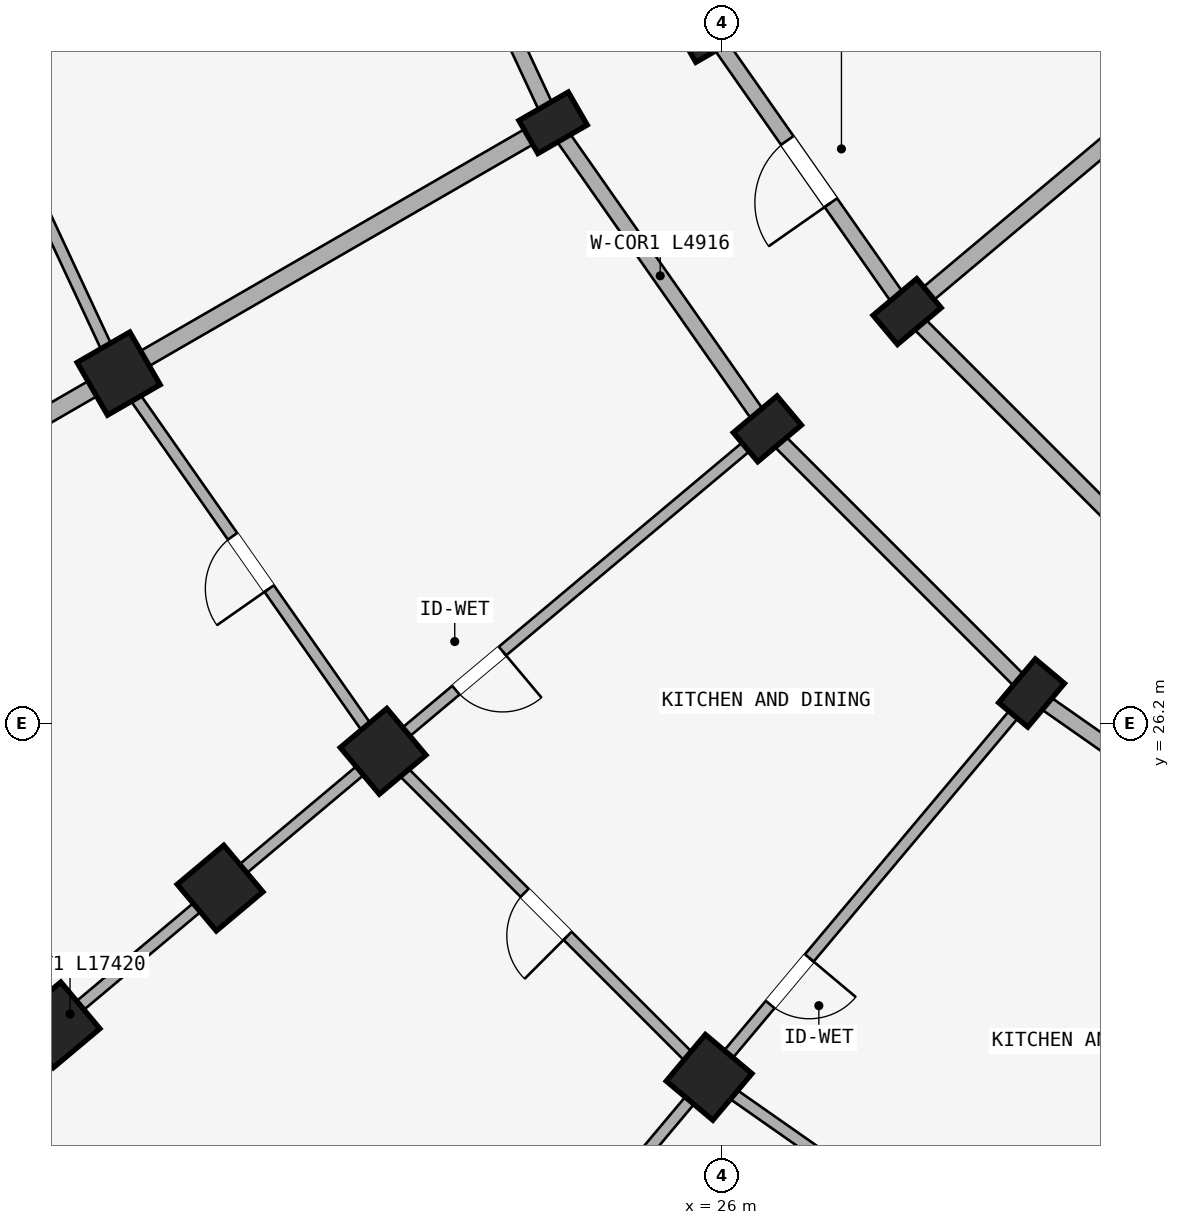
"""IFC4 building model, lengths in metres.
Left out: names, types, materials, properties, quantities, classifications, styles, units other than length and angle.
Written with IfcOpenShell. Run it as: python <this file> out.ifc"""

import sys

from ifc_helpers import new_model, si_unit, direction, frame, frame_2d, origin, origin_2d, place, context, subcontext, project, spatial, rectangle, extrude, element, fill, save


model = new_model("IFC4")
c1 = context("Model", 3, precision=1e-05, world=origin(), true_north=direction((0.0, 1.0)))
c2 = subcontext(c1, "Body", "Model", "MODEL_VIEW")
j1 = project(units=[si_unit("LENGTHUNIT", "METRE"), si_unit("PLANEANGLEUNIT", "RADIAN")], contexts=[c1])
p1 = place(None, origin())
s1 = spatial("IfcSite", under=j1, at=p1, CompositionType="ELEMENT")
p2 = place(p1, origin())
s2 = spatial("IfcBuilding", under=s1, at=p2, CompositionType="ELEMENT")
p3 = place(p2, frame((0.0, 0.0, 8.7)))
s3 = spatial("IfcBuildingStorey", under=s2, at=p3, CompositionType="ELEMENT", Elevation=8.7)
p4 = place(p3, frame((30.073, 26.598, 0.0), z_axis=(0.0, 0.0, 1.0), x_axis=(-0.766044443119, 0.642787609687, 0.0)))
e1 = element("IfcColumn", 1, at=p4, inside=s3, PredefinedType="COLUMN", context=c2, shape_type="SweptSolid", body=[
    extrude(rectangle(XDim=0.5, YDim=0.75, at=origin_2d()), origin(), (0.0, 0.0, 1.0), 2.93),
])
p5 = place(p3, frame((25.831, 21.542, 0.0), z_axis=(0.0, 0.0, 1.0), x_axis=(-0.766044443119, 0.642787609687, 0.0)))
e2 = element("IfcColumn", 2, at=p5, inside=s3, PredefinedType="COLUMN", context=c2, shape_type="SweptSolid", body=[
    extrude(rectangle(XDim=0.8, YDim=0.8, at=origin_2d()), origin(), (0.0, 0.0, 1.0), 2.93),
])
for number, where, z_axis, x_axis in (
    (3, (28.436, 31.616, 0.0), (0.0, 0.0, 1.0), (-0.643, 0.766, 0.0)),
    (4, (26.598, 30.073, 0.0), (0.0, 0.0, 1.0), (-0.643, 0.766, 0.0)),
):
    element("IfcColumn", number, at=place(p3, frame(where, z_axis=z_axis, x_axis=x_axis)), inside=s3, PredefinedType="COLUMN", context=c2, shape_type="SweptSolid", body=[
        extrude(rectangle(XDim=0.5, YDim=0.75, at=origin_2d()), origin(), (0.0, 0.0, 1.0), 2.93),
    ])
for number, where, z_axis, x_axis in (
    (5, (21.542, 25.831, 0.0), (0.0, 0.0, 1.0), (-0.643, 0.766, 0.0)),
    (6, (19.397, 24.031, 0.0), (0.0, 0.0, 1.0), (-0.643, 0.766, 0.0)),
    (7, (17.252, 22.231, 0.0), (0.0, 0.0, 1.0), (-0.643, 0.766, 0.0)),
):
    element("IfcColumn", number, at=place(p3, frame(where, z_axis=z_axis, x_axis=x_axis)), inside=s3, PredefinedType="COLUMN", context=c2, shape_type="SweptSolid", body=[
        extrude(rectangle(XDim=0.8, YDim=0.8, at=origin_2d()), origin(), (0.0, 0.0, 1.0), 2.93),
    ])
for number, where, z_axis, x_axis in (
    (8, (25.856, 35.3, 0.0), (0.0, 0.0, 1.0), (-0.5, 0.866, 0.0)),
    (9, (23.778, 34.1, 0.0), (0.0, 0.0, 1.0), (-0.5, 0.866, 0.0)),
):
    element("IfcColumn", number, at=place(p3, frame(where, z_axis=z_axis, x_axis=x_axis)), inside=s3, PredefinedType="COLUMN", context=c2, shape_type="SweptSolid", body=[
        extrude(rectangle(XDim=0.5, YDim=0.75, at=origin_2d()), origin(), (0.0, 0.0, 1.0), 2.93),
    ])
p6 = place(p3, frame((18.062, 30.8, 0.0), z_axis=(0.0, 0.0, 1.0), x_axis=(-0.5, 0.866025403784, 0.0)))
e10 = element("IfcColumn", 10, at=p6, inside=s3, PredefinedType="COLUMN", context=c2, shape_type="SweptSolid", body=[
    extrude(rectangle(XDim=0.8, YDim=0.8, at=origin_2d()), origin(), (0.0, 0.0, 1.0), 2.93),
])
p7 = place(p3, frame((34.1, 23.778, 0.0), z_axis=(0.0, 0.0, 1.0), x_axis=(-0.819140911474, 0.573592335331, 0.0)))
e11 = element("IfcWall", 11, at=p7, inside=s3, PredefinedType="STANDARD", context=c2, shape_type="SweptSolid", body=[
    extrude(rectangle(XDim=4.916, YDim=0.2, at=frame_2d((2.458, 0.0))), origin(), (0.0, 0.0, 1.0), 2.372),
])
p8 = place(p7, frame((1.918, 0.0, 0.0)))
e12 = element("IfcOpeningElement", 12, at=p8, cuts=e11, PredefinedType="OPENING", context=c2, shape_type="SweptSolid", body=[
    extrude(rectangle(XDim=1.08, YDim=2.15, at=frame_2d((0.54, 1.075))), frame((0.0, 0.11, 0.0), z_axis=(0.0, -1.0, 0.0), x_axis=(1.0, 0.0, 0.0)), (0.0, 0.0, 1.0), 0.22),
])
p9 = place(p3, frame((31.616, 28.436, 0.0), z_axis=(0.0, 0.0, 1.0), x_axis=(-0.707106781187, 0.707106781187, 0.0)))
e13 = element("IfcWall", 13, at=p9, inside=s3, PredefinedType="STANDARD", context=c2, shape_type="SweptSolid", body=[
    extrude(rectangle(XDim=4.497, YDim=0.2, at=frame_2d((2.249, 0.0))), origin(), (0.0, 0.0, 1.0), 2.372),
])
p10 = place(p3, frame((30.073, 26.598, 0.0), z_axis=(0.0, 0.0, 1.0), x_axis=(-0.707106781187, 0.707106781187, 0.0)))
e14 = element("IfcWall", 14, at=p10, inside=s3, PredefinedType="STANDARD", context=c2, shape_type="SweptSolid", body=[
    extrude(rectangle(XDim=4.916, YDim=0.2, at=frame_2d((2.458, 0.0))), origin(), (0.0, 0.0, 1.0), 2.372),
])
p11 = place(p3, frame((28.436, 31.616, 0.0), z_axis=(0.0, 0.0, 1.0), x_axis=(-0.573571637217, 0.819155404658, 0.0)))
e15 = element("IfcWall", 15, at=p11, inside=s3, PredefinedType="STANDARD", context=c2, shape_type="SweptSolid", body=[
    extrude(rectangle(XDim=4.497, YDim=0.2, at=frame_2d((2.249, 0.0))), origin(), (0.0, 0.0, 1.0), 2.372),
])
p12 = place(p11, frame((1.749, 0.0, 0.0)))
e16 = element("IfcOpeningElement", 16, at=p12, cuts=e15, PredefinedType="OPENING", context=c2, shape_type="SweptSolid", body=[
    extrude(rectangle(XDim=1.0, YDim=2.15, at=frame_2d((0.5, 1.075))), frame((0.0, 0.11, 0.0), z_axis=(0.0, -1.0, 0.0), x_axis=(1.0, 0.0, 0.0)), (0.0, 0.0, 1.0), 0.22),
])
p13 = place(p3, frame((26.598, 30.073, 0.0), z_axis=(0.0, 0.0, 1.0), x_axis=(-0.573592335331, 0.819140911474, 0.0)))
e17 = element("IfcWall", 17, at=p13, inside=s3, PredefinedType="STANDARD", context=c2, shape_type="SweptSolid", body=[
    extrude(rectangle(XDim=4.916, YDim=0.2, at=frame_2d((2.458, 0.0))), origin(), (0.0, 0.0, 1.0), 2.372),
])
p14 = place(p3, frame((23.778, 34.1, 0.0), z_axis=(0.0, 0.0, 1.0), x_axis=(-0.422629854778, 0.906302381024, 0.0)))
e18 = element("IfcWall", 18, at=p14, inside=s3, PredefinedType="STANDARD", context=c2, shape_type="SweptSolid", body=[
    extrude(rectangle(XDim=4.915, YDim=0.2, at=frame_2d((2.458, 0.0))), origin(), (0.0, 0.0, 1.0), 2.372),
])
p15 = place(p14, frame((1.888, 0.0, 0.0)))
e19 = element("IfcOpeningElement", 19, at=p15, cuts=e18, PredefinedType="OPENING", context=c2, shape_type="SweptSolid", body=[
    extrude(rectangle(XDim=1.14, YDim=2.15, at=frame_2d((0.57, 1.075))), frame((0.0, 0.11, 0.0), z_axis=(0.0, -1.0, 0.0), x_axis=(1.0, 0.0, 0.0)), (0.0, 0.0, 1.0), 0.22),
])
p16 = place(p3, frame((34.05, 23.691, 0.0), z_axis=(0.0, 0.0, 1.0), x_axis=(-0.499997843263, -0.866026648973, 0.0)))
e20 = element("IfcWall", 20, at=p16, inside=s3, PredefinedType="STANDARD", context=c2, shape_type="SweptSolid", body=[
    extrude(rectangle(XDim=17.42, YDim=0.23, at=frame_2d((8.71, 0.0))), origin(), (0.0, 0.0, 1.0), 2.372),
])
p17 = place(p3, frame((30.009, 26.521, 0.0), z_axis=(0.0, 0.0, 1.0), x_axis=(-0.642784757967, -0.766046835987, 0.0)))
e21 = element("IfcWall", 21, at=p17, inside=s3, PredefinedType="PARTITIONING", context=c2, shape_type="SweptSolid", body=[
    extrude(rectangle(XDim=17.42, YDim=0.15, at=frame_2d((8.71, 0.0))), origin(), (0.0, 0.0, 1.0), 2.372),
])
p18 = place(p17, frame((4.45, 0.0, 0.0)))
e22 = element("IfcOpeningElement", 22, at=p18, cuts=e21, PredefinedType="OPENING", context=c2, shape_type="SweptSolid", body=[
    extrude(rectangle(XDim=0.8, YDim=2.1, at=frame_2d((0.4, 1.05))), frame((0.0, 0.085, 0.0), z_axis=(0.0, -1.0, 0.0), x_axis=(1.0, 0.0, 0.0)), (0.0, 0.0, 1.0), 0.17),
])
p19 = place(p3, frame((33.645, 35.987, 0.0), z_axis=(0.0, 0.0, 1.0), x_axis=(-0.766046761698, -0.642784846501, 0.0)))
e23 = element("IfcWall", 23, at=p19, inside=s3, PredefinedType="STANDARD", context=c2, shape_type="SweptSolid", body=[
    extrude(rectangle(XDim=6.75, YDim=0.22, at=frame_2d((3.375, 0.0))), origin(), (0.0, 0.0, 1.0), 2.372),
])
p20 = place(p3, frame((26.521, 30.009, 0.0), z_axis=(0.0, 0.0, 1.0), x_axis=(-0.766046835987, -0.642784757967, 0.0)))
e24 = element("IfcWall", 24, at=p20, inside=s3, PredefinedType="PARTITIONING", context=c2, shape_type="SweptSolid", body=[
    extrude(rectangle(XDim=17.42, YDim=0.15, at=frame_2d((8.71, 0.0))), origin(), (0.0, 0.0, 1.0), 2.372),
])
p21 = place(p20, frame((4.45, 0.0, 0.0)))
e25 = element("IfcOpeningElement", 25, at=p21, cuts=e24, PredefinedType="OPENING", context=c2, shape_type="SweptSolid", body=[
    extrude(rectangle(XDim=0.8, YDim=2.1, at=frame_2d((0.4, 1.05))), frame((0.0, 0.085, 0.0), z_axis=(0.0, -1.0, 0.0), x_axis=(1.0, 0.0, 0.0)), (0.0, 0.0, 1.0), 0.17),
])
p22 = place(p3, frame((23.691, 34.05, 0.0), z_axis=(0.0, 0.0, 1.0), x_axis=(-0.866026648973, -0.499997843263, 0.0)))
e26 = element("IfcWall", 26, at=p22, inside=s3, PredefinedType="STANDARD", context=c2, shape_type="SweptSolid", body=[
    extrude(rectangle(XDim=17.42, YDim=0.23, at=frame_2d((8.71, 0.0))), origin(), (0.0, 0.0, 1.0), 2.372),
])
p23 = place(p3, frame((21.607, 38.521, 0.0), z_axis=(0.0, 0.0, 1.0), x_axis=(-0.939691901159, -0.342022120477, 0.0)))
e27 = element("IfcWall", 27, at=p23, inside=s3, PredefinedType="PARTITIONING", context=c2, shape_type="SweptSolid", body=[
    extrude(rectangle(XDim=17.42, YDim=0.15, at=frame_2d((8.71, 0.0))), origin(), (0.0, 0.0, 1.0), 2.372),
])
p24 = place(p23, frame((4.45, 0.0, 0.0)))
e28 = element("IfcOpeningElement", 28, at=p24, cuts=e27, PredefinedType="OPENING", context=c2, shape_type="SweptSolid", body=[
    extrude(rectangle(XDim=0.8, YDim=2.1, at=frame_2d((0.4, 1.05))), frame((0.0, 0.085, 0.0), z_axis=(0.0, -1.0, 0.0), x_axis=(1.0, 0.0, 0.0)), (0.0, 0.0, 1.0), 0.17),
])
p25 = place(p3, frame((30.8, 18.062, 0.0), z_axis=(0.0, 0.0, 1.0), x_axis=(-0.81913926159, 0.573594691504, 0.0)))
e29 = element("IfcWall", 29, at=p25, inside=s3, PredefinedType="PLUMBINGWALL", context=c2, shape_type="SweptSolid", body=[
    extrude(rectangle(XDim=6.066, YDim=0.15, at=frame_2d((3.033, 0.0))), origin(), (0.0, 0.0, 1.0), 2.372),
])
p26 = place(p25, frame((2.653, 0.0, 0.0)))
e30 = element("IfcOpeningElement", 30, at=p26, cuts=e29, PredefinedType="OPENING", context=c2, shape_type="SweptSolid", body=[
    extrude(rectangle(XDim=0.76, YDim=2.05, at=frame_2d((0.38, 1.025))), frame((0.0, 0.085, 0.0), z_axis=(0.0, -1.0, 0.0), x_axis=(1.0, 0.0, 0.0)), (0.0, 0.0, 1.0), 0.17),
])
p27 = place(p3, frame((25.831, 21.542, 0.0), z_axis=(0.0, 0.0, 1.0), x_axis=(-0.707106781187, 0.707106781187, 0.0)))
e31 = element("IfcWall", 31, at=p27, inside=s3, PredefinedType="PLUMBINGWALL", context=c2, shape_type="SweptSolid", body=[
    extrude(rectangle(XDim=6.066, YDim=0.15, at=frame_2d((3.033, 0.0))), origin(), (0.0, 0.0, 1.0), 2.372),
])
p28 = place(p27, frame((2.633, 0.0, 0.0)))
e32 = element("IfcOpeningElement", 32, at=p28, cuts=e31, PredefinedType="OPENING", context=c2, shape_type="SweptSolid", body=[
    extrude(rectangle(XDim=0.8, YDim=2.1, at=frame_2d((0.4, 1.05))), frame((0.0, 0.085, 0.0), z_axis=(0.0, -1.0, 0.0), x_axis=(1.0, 0.0, 0.0)), (0.0, 0.0, 1.0), 0.17),
])
p29 = place(p3, frame((21.542, 25.831, 0.0), z_axis=(0.0, 0.0, 1.0), x_axis=(-0.573594691504, 0.81913926159, 0.0)))
e33 = element("IfcWall", 33, at=p29, inside=s3, PredefinedType="PLUMBINGWALL", context=c2, shape_type="SweptSolid", body=[
    extrude(rectangle(XDim=6.066, YDim=0.15, at=frame_2d((3.033, 0.0))), origin(), (0.0, 0.0, 1.0), 2.372),
])
p30 = place(p29, frame((2.613, 0.0, 0.0)))
e34 = element("IfcOpeningElement", 34, at=p30, cuts=e33, PredefinedType="OPENING", context=c2, shape_type="SweptSolid", body=[
    extrude(rectangle(XDim=0.84, YDim=2.1, at=frame_2d((0.42, 1.05))), frame((0.0, 0.085, 0.0), z_axis=(0.0, -1.0, 0.0), x_axis=(1.0, 0.0, 0.0)), (0.0, 0.0, 1.0), 0.17),
])
p31 = place(p3, frame((18.062, 30.8, 0.0), z_axis=(0.0, 0.0, 1.0), x_axis=(-0.42260781991, 0.906312656069, 0.0)))
e35 = element("IfcWall", 35, at=p31, inside=s3, PredefinedType="PLUMBINGWALL", context=c2, shape_type="SweptSolid", body=[
    extrude(rectangle(XDim=6.066, YDim=0.15, at=frame_2d((3.033, 0.0))), origin(), (0.0, 0.0, 1.0), 2.372),
])
p32 = place(p31, frame((2.653, 0.0, 0.0)))
e36 = element("IfcOpeningElement", 36, at=p32, cuts=e35, PredefinedType="OPENING", context=c2, shape_type="SweptSolid", body=[
    extrude(rectangle(XDim=0.76, YDim=2.05, at=frame_2d((0.38, 1.025))), frame((0.0, 0.085, 0.0), z_axis=(0.0, -1.0, 0.0), x_axis=(1.0, 0.0, 0.0)), (0.0, 0.0, 1.0), 0.17),
])
p33 = place(p18, frame((0.8, 0.0, 0.0), z_axis=(0.0, 0.0, 1.0), x_axis=(-1.0, 0.0, 0.0)))
e37 = element("IfcDoor", 37, at=p33, inside=s3, OperationType="SINGLE_SWING_RIGHT", PredefinedType="DOOR", context=c2, shape_type="SweptSolid", body=[
    extrude(rectangle(XDim=0.8, YDim=2.1, at=frame_2d((0.4, 1.05))), frame((0.0, 0.025, 0.0), z_axis=(0.0, -1.0, 0.0), x_axis=(1.0, 0.0, 0.0)), (0.0, 0.0, 1.0), 0.05),
])
fill(e22, e37)
p34 = place(p21, origin())
e38 = element("IfcDoor", 38, at=p34, inside=s3, OperationType="SINGLE_SWING_LEFT", PredefinedType="DOOR", context=c2, shape_type="SweptSolid", body=[
    extrude(rectangle(XDim=0.8, YDim=2.1, at=frame_2d((0.4, 1.05))), frame((0.0, 0.025, 0.0), z_axis=(0.0, -1.0, 0.0), x_axis=(1.0, 0.0, 0.0)), (0.0, 0.0, 1.0), 0.05),
])
fill(e25, e38)
p35 = place(p28, origin())
e39 = element("IfcDoor", 39, at=p35, inside=s3, OperationType="SINGLE_SWING_LEFT", PredefinedType="DOOR", context=c2, shape_type="SweptSolid", body=[
    extrude(rectangle(XDim=0.8, YDim=2.1, at=frame_2d((0.4, 1.05))), frame((0.0, 0.025, 0.0), z_axis=(0.0, -1.0, 0.0), x_axis=(1.0, 0.0, 0.0)), (0.0, 0.0, 1.0), 0.05),
])
fill(e32, e39)
p36 = place(p30, frame((0.84, 0.0, 0.0), z_axis=(0.0, 0.0, 1.0), x_axis=(-1.0, 0.0, 0.0)))
e40 = element("IfcDoor", 40, at=p36, inside=s3, OperationType="SINGLE_SWING_RIGHT", PredefinedType="DOOR", context=c2, shape_type="SweptSolid", body=[
    extrude(rectangle(XDim=0.84, YDim=2.1, at=frame_2d((0.42, 1.05))), frame((0.0, 0.025, 0.0), z_axis=(0.0, -1.0, 0.0), x_axis=(1.0, 0.0, 0.0)), (0.0, 0.0, 1.0), 0.05),
])
fill(e34, e40)
p37 = place(p12, origin())
e41 = element("IfcDoor", 41, at=p37, inside=s3, OperationType="SINGLE_SWING_LEFT", PredefinedType="DOOR", context=c2, shape_type="SweptSolid", body=[
    extrude(rectangle(XDim=1.0, YDim=2.15, at=frame_2d((0.5, 1.075))), frame((0.0, 0.025, 0.0), z_axis=(0.0, -1.0, 0.0), x_axis=(1.0, 0.0, 0.0)), (0.0, 0.0, 1.0), 0.05),
])
fill(e16, e41)
save(model, sys.argv[1])
